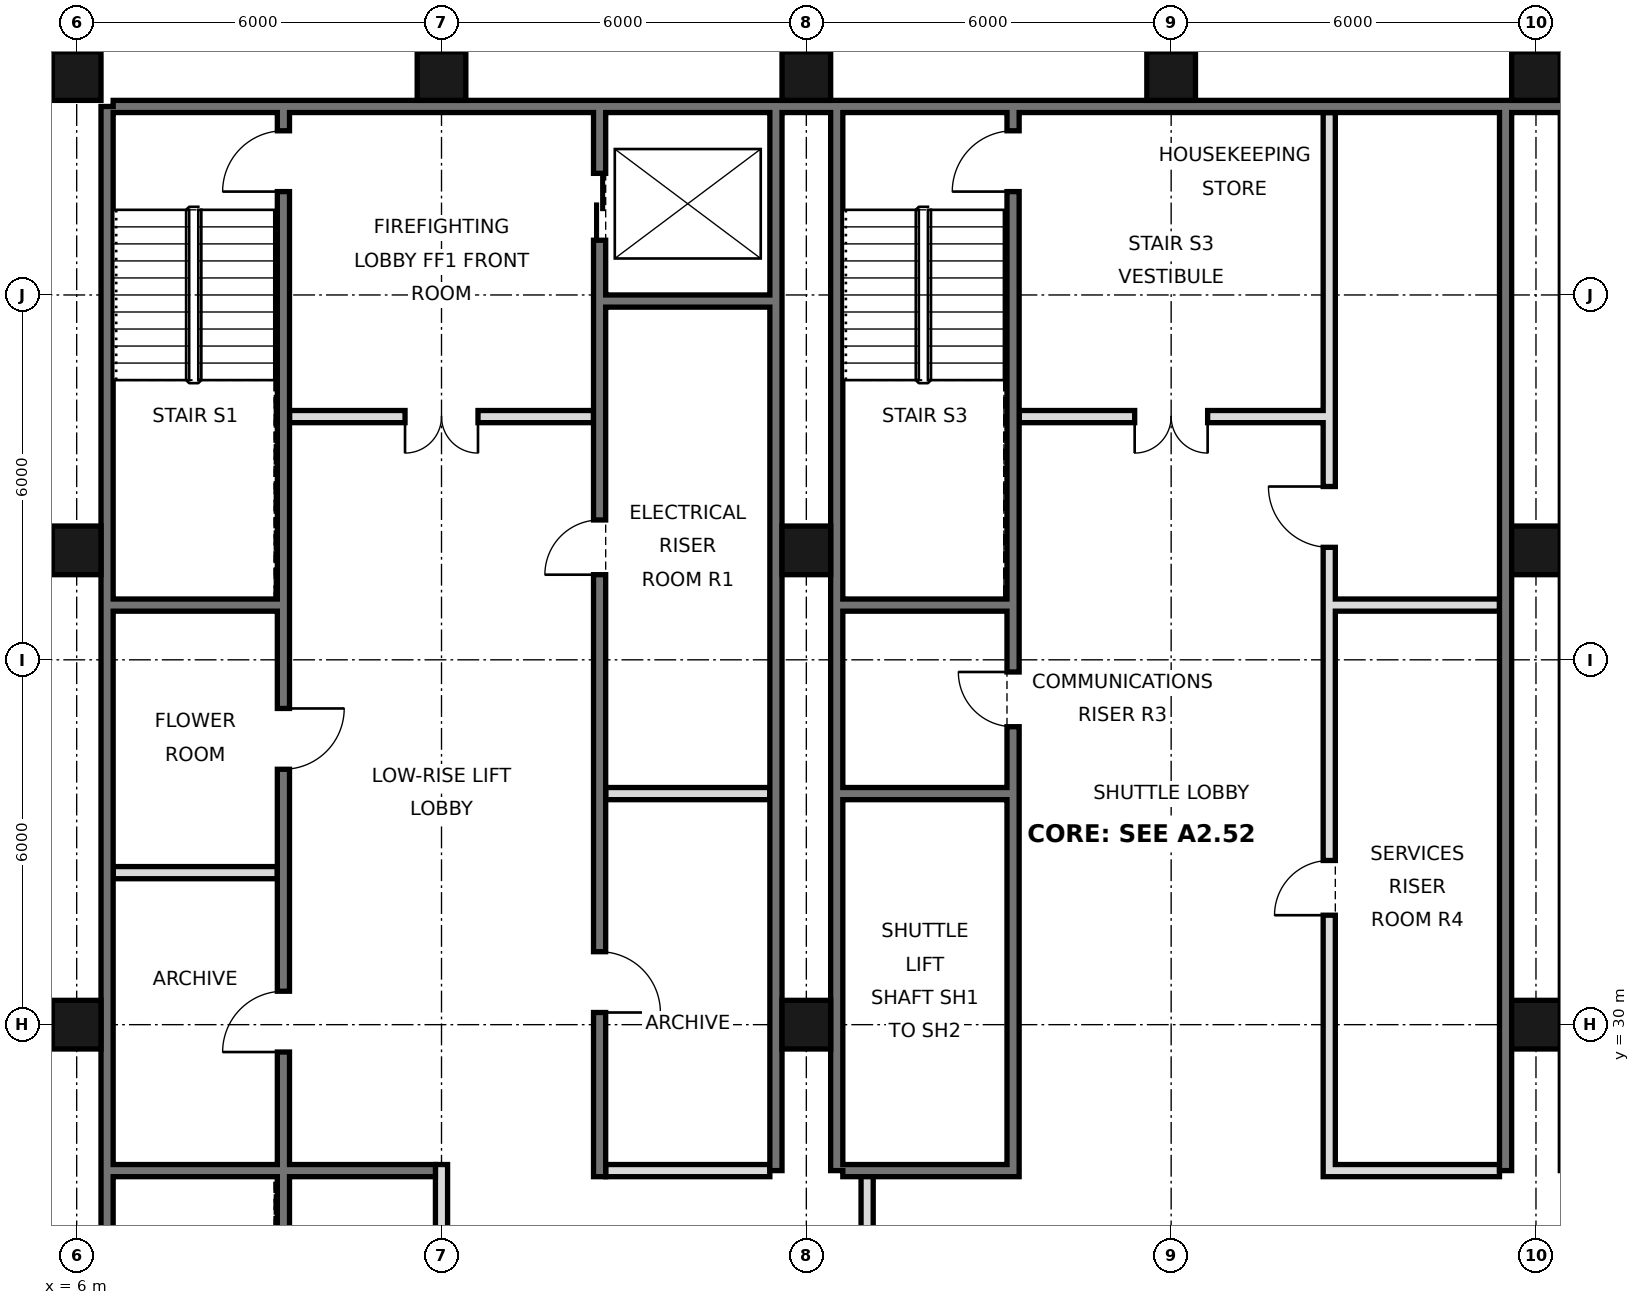
"""IFC4 building model, lengths in metres.
Left out: names, types, materials, properties, quantities, classifications, styles, units other than length and angle.
Written with IfcOpenShell. Run it as: python <this file> out.ifc"""

import sys

from ifc_helpers import new_model, si_unit, direction, frame, frame_2d, origin, origin_2d, place, context, subcontext, project, spatial, rectangle, hollow_rectangle, extrude, element, fill, save


model = new_model("IFC4")
c1 = context("Model", 3, precision=1e-05, world=origin(), true_north=direction((0.0, 1.0)))
c2 = subcontext(c1, "Body", "Model", "MODEL_VIEW")
j1 = project(units=[si_unit("LENGTHUNIT", "METRE"), si_unit("PLANEANGLEUNIT", "RADIAN")], contexts=[c1])
p1 = place(None, origin())
s1 = spatial("IfcSite", under=j1, at=p1, CompositionType="ELEMENT")
p2 = place(p1, origin())
s2 = spatial("IfcBuilding", under=s1, at=p2, CompositionType="ELEMENT")
p3 = place(p2, frame((0.0, 0.0, 206.4)))
s3 = spatial("IfcBuildingStorey", under=s2, at=p3, CompositionType="ELEMENT", Elevation=206.4)
for number, where, z_axis, x_axis in (
    (1, (6.0, 30.0, 0.0), (0.0, 0.0, 1.0), (1.0, 0.0, 0.0)),
    (2, (6.0, 37.8, 0.0), (0.0, 0.0, 1.0), (1.0, 0.0, 0.0)),
    (3, (6.0, 45.6, 0.0), (0.0, 0.0, 1.0), (1.0, 0.0, 0.0)),
    (4, (12.0, 45.6, 0.0), (0.0, 0.0, 1.0), (1.0, 0.0, 0.0)),
    (5, (18.0, 30.0, 0.0), (0.0, 0.0, 1.0), (1.0, 0.0, 0.0)),
    (6, (18.0, 37.8, 0.0), (0.0, 0.0, 1.0), (1.0, 0.0, 0.0)),
    (7, (18.0, 45.6, 0.0), (0.0, 0.0, 1.0), (1.0, 0.0, 0.0)),
    (8, (24.0, 45.6, 0.0), (0.0, 0.0, 1.0), (1.0, 0.0, 0.0)),
    (9, (30.0, 30.0, 0.0), (0.0, 0.0, 1.0), (1.0, 0.0, 0.0)),
    (10, (30.0, 37.8, 0.0), (0.0, 0.0, 1.0), (1.0, 0.0, 0.0)),
    (11, (30.0, 45.6, 0.0), (0.0, 0.0, 1.0), (1.0, 0.0, 0.0)),
):
    element("IfcColumn", number, at=place(p3, frame(where, z_axis=z_axis, x_axis=x_axis)), inside=s3, PredefinedType="COLUMN", context=c2, shape_type="SweptSolid", body=[
        extrude(hollow_rectangle(XDim=0.8, YDim=0.8, WallThickness=0.04, at=origin_2d()), origin(), (0.0, 0.0, 1.0), 3.6),
    ])
p4 = place(p3, frame((6.5, 21.6, 0.0), z_axis=(0.0, 0.0, 1.0), x_axis=(0.0, 1.0, 0.0)))
e12 = element("IfcWall", 12, at=p4, inside=s3, PredefinedType="SOLIDWALL", context=c2, shape_type="SweptSolid", body=[
    extrude(rectangle(XDim=23.5, YDim=0.2, at=frame_2d((11.75, 0.0))), origin(), (0.0, 0.0, 1.0), 3.38),
])
p5 = place(p3, frame((6.6, 45.1, 0.0), z_axis=(0.0, 0.0, 1.0), x_axis=(1.0, 0.0, 0.0)))
e13 = element("IfcWall", 13, at=p5, inside=s3, PredefinedType="SOLIDWALL", context=c2, shape_type="SweptSolid", body=[
    extrude(rectangle(XDim=34.8, YDim=0.2, at=frame_2d((17.4, 0.0))), origin(), (0.0, 0.0, 1.0), 3.38),
])
for number, where, z_axis, x_axis in (
    (14, (17.5, 27.6, 0.0), (0.0, 0.0, 1.0), (0.0, 1.0, 0.0)),
    (15, (18.5, 27.6, 0.0), (0.0, 0.0, 1.0), (0.0, 1.0, 0.0)),
    (16, (29.5, 27.6, 0.0), (0.0, 0.0, 1.0), (0.0, 1.0, 0.0)),
):
    element("IfcWall", number, at=place(p3, frame(where, z_axis=z_axis, x_axis=x_axis)), inside=s3, PredefinedType="SOLIDWALL", context=c2, shape_type="SweptSolid", body=[
        extrude(rectangle(XDim=17.5, YDim=0.2, at=frame_2d((8.75, 0.0))), origin(), (0.0, 0.0, 1.0), 3.38),
    ])
p6 = place(p3, frame((19.0, 21.6, 0.0), z_axis=(0.0, 0.0, 1.0), x_axis=(0.0, 1.0, 0.0)))
e17 = element("IfcWall", 17, at=p6, inside=s3, PredefinedType="PARTITIONING", context=c2, shape_type="SweptSolid", body=[
    extrude(rectangle(XDim=6.0, YDim=0.2, at=frame_2d((3.0, 0.0))), origin(), (0.0, 0.0, 1.0), 3.38),
])
p7 = place(p6, frame((2.1, 0.0, 0.0)))
e18 = element("IfcOpeningElement", 18, at=p7, cuts=e17, PredefinedType="OPENING", context=c2, shape_type="SweptSolid", body=[
    extrude(rectangle(XDim=1.8, YDim=2.1, at=frame_2d((0.9, 1.05))), frame((0.0, 0.11, 0.0), z_axis=(0.0, -1.0, 0.0), x_axis=(1.0, 0.0, 0.0)), (0.0, 0.0, 1.0), 0.22),
])
p8 = place(p3, frame((12.0, 21.6, 0.0), z_axis=(0.0, 0.0, 1.0), x_axis=(0.0, 1.0, 0.0)))
e19 = element("IfcWall", 19, at=p8, inside=s3, PredefinedType="PARTITIONING", context=c2, shape_type="SweptSolid", body=[
    extrude(rectangle(XDim=6.1, YDim=0.2, at=frame_2d((3.05, 0.0))), origin(), (0.0, 0.0, 1.0), 3.38),
])
p9 = place(p3, frame((14.6, 27.5, 0.0), z_axis=(0.0, 0.0, 1.0), x_axis=(0.0, 1.0, 0.0)))
e20 = element("IfcWall", 20, at=p9, inside=s3, PredefinedType="SOLIDWALL", context=c2, shape_type="SweptSolid", body=[
    extrude(rectangle(XDim=17.5, YDim=0.2, at=frame_2d((8.75, 0.0))), origin(), (0.0, 0.0, 1.0), 3.38),
])
p10 = place(p9, frame((15.4, 0.0, 0.0)))
e21 = element("IfcOpeningElement", 21, at=p10, cuts=e20, PredefinedType="OPENING", context=c2, shape_type="SweptSolid", body=[
    extrude(rectangle(XDim=1.1, YDim=2.1, at=frame_2d((0.55, 1.05))), frame((0.0, 0.11, 0.0), z_axis=(0.0, -1.0, 0.0), x_axis=(1.0, 0.0, 0.0)), (0.0, 0.0, 1.0), 0.22),
])
p11 = place(p9, frame((2.7, 0.0, 0.0)))
e22 = element("IfcOpeningElement", 22, at=p11, cuts=e20, PredefinedType="OPENING", context=c2, shape_type="SweptSolid", body=[
    extrude(rectangle(XDim=1.0, YDim=2.1, at=frame_2d((0.5, 1.05))), frame((0.0, 0.11, 0.0), z_axis=(0.0, -1.0, 0.0), x_axis=(1.0, 0.0, 0.0)), (0.0, 0.0, 1.0), 0.22),
])
p12 = place(p9, frame((9.9, 0.0, 0.0)))
e23 = element("IfcOpeningElement", 23, at=p12, cuts=e20, PredefinedType="OPENING", context=c2, shape_type="SweptSolid", body=[
    extrude(rectangle(XDim=0.9, YDim=2.1, at=frame_2d((0.45, 1.05))), frame((0.0, 0.11, 0.0), z_axis=(0.0, -1.0, 0.0), x_axis=(1.0, 0.0, 0.0)), (0.0, 0.0, 1.0), 0.22),
])
p13 = place(p3, frame((21.4, 27.5, 0.0), z_axis=(0.0, 0.0, 1.0), x_axis=(0.0, 1.0, 0.0)))
e24 = element("IfcWall", 24, at=p13, inside=s3, PredefinedType="SOLIDWALL", context=c2, shape_type="SweptSolid", body=[
    extrude(rectangle(XDim=17.5, YDim=0.2, at=frame_2d((8.75, 0.0))), origin(), (0.0, 0.0, 1.0), 3.38),
])
p14 = place(p13, frame((16.2, 0.0, 0.0)))
e25 = element("IfcOpeningElement", 25, at=p14, cuts=e24, PredefinedType="OPENING", context=c2, shape_type="SweptSolid", body=[
    extrude(rectangle(XDim=1.0, YDim=2.1, at=frame_2d((0.5, 1.05))), frame((0.0, 0.11, 0.0), z_axis=(0.0, -1.0, 0.0), x_axis=(1.0, 0.0, 0.0)), (0.0, 0.0, 1.0), 0.22),
])
p15 = place(p13, frame((7.4, 0.0, 0.0)))
e26 = element("IfcOpeningElement", 26, at=p15, cuts=e24, PredefinedType="OPENING", context=c2, shape_type="SweptSolid", body=[
    extrude(rectangle(XDim=0.9, YDim=2.1, at=frame_2d((0.45, 1.05))), frame((0.0, 0.11, 0.0), z_axis=(0.0, -1.0, 0.0), x_axis=(1.0, 0.0, 0.0)), (0.0, 0.0, 1.0), 0.22),
])
p16 = place(p3, frame((26.6, 27.5, 0.0), z_axis=(0.0, 0.0, 1.0), x_axis=(0.0, 1.0, 0.0)))
e27 = element("IfcWall", 27, at=p16, inside=s3, PredefinedType="SOLIDWALL", context=c2, shape_type="SweptSolid", body=[
    extrude(rectangle(XDim=17.5, YDim=0.2, at=frame_2d((8.75, 0.0))), origin(), (0.0, 0.0, 1.0), 3.38),
])
p17 = place(p16, frame((4.3, 0.0, 0.0)))
e28 = element("IfcOpeningElement", 28, at=p17, cuts=e27, PredefinedType="OPENING", context=c2, shape_type="SweptSolid", body=[
    extrude(rectangle(XDim=0.9, YDim=2.1, at=frame_2d((0.45, 1.05))), frame((0.0, 0.11, 0.0), z_axis=(0.0, -1.0, 0.0), x_axis=(1.0, 0.0, 0.0)), (0.0, 0.0, 1.0), 0.22),
])
p18 = place(p16, frame((10.35, 0.0, 0.0)))
e29 = element("IfcOpeningElement", 29, at=p18, cuts=e27, PredefinedType="OPENING", context=c2, shape_type="SweptSolid", body=[
    extrude(rectangle(XDim=1.0, YDim=2.1, at=frame_2d((0.5, 1.05))), frame((0.0, 0.11, 0.0), z_axis=(0.0, -1.0, 0.0), x_axis=(1.0, 0.0, 0.0)), (0.0, 0.0, 1.0), 0.22),
])
p19 = place(p3, frame((9.4, 21.6, 0.0), z_axis=(0.0, 0.0, 1.0), x_axis=(0.0, 1.0, 0.0)))
e30 = element("IfcWall", 30, at=p19, inside=s3, PredefinedType="SOLIDWALL", context=c2, shape_type="SweptSolid", body=[
    extrude(rectangle(XDim=23.4, YDim=0.2, at=frame_2d((11.7, 0.0))), origin(), (0.0, 0.0, 1.0), 3.38),
])
p20 = place(p19, frame((7.95, 0.0, 0.0)))
e31 = element("IfcOpeningElement", 31, at=p20, cuts=e30, PredefinedType="OPENING", context=c2, shape_type="SweptSolid", body=[
    extrude(rectangle(XDim=1.0, YDim=2.1, at=frame_2d((0.5, 1.05))), frame((0.0, 0.11, 0.0), z_axis=(0.0, -1.0, 0.0), x_axis=(1.0, 0.0, 0.0)), (0.0, 0.0, 1.0), 0.22),
])
p21 = place(p19, frame((12.6, 0.0, 0.0)))
e32 = element("IfcOpeningElement", 32, at=p21, cuts=e30, PredefinedType="OPENING", context=c2, shape_type="SweptSolid", body=[
    extrude(rectangle(XDim=1.0, YDim=2.1, at=frame_2d((0.5, 1.05))), frame((0.0, 0.11, 0.0), z_axis=(0.0, -1.0, 0.0), x_axis=(1.0, 0.0, 0.0)), (0.0, 0.0, 1.0), 0.22),
])
p22 = place(p19, frame((22.1, 0.0, 0.0)))
e33 = element("IfcOpeningElement", 33, at=p22, cuts=e30, PredefinedType="OPENING", context=c2, shape_type="SweptSolid", body=[
    extrude(rectangle(XDim=1.0, YDim=2.1, at=frame_2d((0.5, 1.05))), frame((0.0, 0.11, 0.0), z_axis=(0.0, -1.0, 0.0), x_axis=(1.0, 0.0, 0.0)), (0.0, 0.0, 1.0), 0.22),
])
p23 = place(p19, frame((0.175, 0.0, 0.0)))
e34 = element("IfcOpeningElement", 34, at=p23, cuts=e30, PredefinedType="OPENING", context=c2, shape_type="SweptSolid", body=[
    extrude(rectangle(XDim=0.9, YDim=2.1, at=frame_2d((0.45, 1.05))), frame((0.0, 0.11, 0.0), z_axis=(0.0, -1.0, 0.0), x_axis=(1.0, 0.0, 0.0)), (0.0, 0.0, 1.0), 0.22),
])
p24 = place(p3, frame((14.7, 27.6, 0.0), z_axis=(0.0, 0.0, 1.0), x_axis=(1.0, 0.0, 0.0)))
e35 = element("IfcWall", 35, at=p24, inside=s3, PredefinedType="PARTITIONING", context=c2, shape_type="SweptSolid", body=[
    extrude(rectangle(XDim=2.7, YDim=0.2, at=frame_2d((1.35, 0.0))), origin(), (0.0, 0.0, 1.0), 3.38),
])
for number, where, z_axis, x_axis in (
    (36, (18.6, 27.6, 0.0), (0.0, 0.0, 1.0), (1.0, 0.0, 0.0)),
    (37, (26.7, 27.6, 0.0), (0.0, 0.0, 1.0), (1.0, 0.0, 0.0)),
):
    element("IfcWall", number, at=place(p3, frame(where, z_axis=z_axis, x_axis=x_axis)), inside=s3, PredefinedType="SOLIDWALL", context=c2, shape_type="SweptSolid", body=[
        extrude(rectangle(XDim=2.7, YDim=0.2, at=frame_2d((1.35, 0.0))), origin(), (0.0, 0.0, 1.0), 3.38),
    ])
p25 = place(p3, frame((6.6, 27.6, 0.0), z_axis=(0.0, 0.0, 1.0), x_axis=(1.0, 0.0, 0.0)))
e38 = element("IfcWall", 38, at=p25, inside=s3, PredefinedType="SOLIDWALL", context=c2, shape_type="SweptSolid", body=[
    extrude(rectangle(XDim=5.3, YDim=0.2, at=frame_2d((2.65, 0.0))), origin(), (0.0, 0.0, 1.0), 3.38),
])
p26 = place(p3, frame((6.6, 32.5, 0.0), z_axis=(0.0, 0.0, 1.0), x_axis=(1.0, 0.0, 0.0)))
e39 = element("IfcWall", 39, at=p26, inside=s3, PredefinedType="PARTITIONING", context=c2, shape_type="SweptSolid", body=[
    extrude(rectangle(XDim=2.7, YDim=0.2, at=frame_2d((1.35, 0.0))), origin(), (0.0, 0.0, 1.0), 3.38),
])
for number, where, z_axis, x_axis in (
    (40, (14.7, 33.8, 0.0), (0.0, 0.0, 1.0), (1.0, 0.0, 0.0)),
    (41, (18.6, 33.8, 0.0), (0.0, 0.0, 1.0), (1.0, 0.0, 0.0)),
    (42, (18.6, 36.9, 0.0), (0.0, 0.0, 1.0), (1.0, 0.0, 0.0)),
    (43, (26.7, 36.9, 0.0), (0.0, 0.0, 1.0), (1.0, 0.0, 0.0)),
    (44, (6.6, 36.9, 0.0), (0.0, 0.0, 1.0), (1.0, 0.0, 0.0)),
):
    element("IfcWall", number, at=place(p3, frame(where, z_axis=z_axis, x_axis=x_axis)), inside=s3, PredefinedType="SOLIDWALL", context=c2, shape_type="SweptSolid", body=[
        extrude(rectangle(XDim=2.7, YDim=0.2, at=frame_2d((1.35, 0.0))), origin(), (0.0, 0.0, 1.0), 3.38),
    ])
p27 = place(p3, frame((21.5, 40.0, 0.0), z_axis=(0.0, 0.0, 1.0), x_axis=(1.0, 0.0, 0.0)))
e45 = element("IfcWall", 45, at=p27, inside=s3, PredefinedType="PARTITIONING", context=c2, shape_type="SweptSolid", body=[
    extrude(rectangle(XDim=5.0, YDim=0.2, at=frame_2d((2.5, 0.0))), origin(), (0.0, 0.0, 1.0), 3.38),
])
p28 = place(p27, frame((1.9, 0.0, 0.0)))
e46 = element("IfcOpeningElement", 46, at=p28, cuts=e45, PredefinedType="OPENING", context=c2, shape_type="SweptSolid", body=[
    extrude(rectangle(XDim=1.2, YDim=2.1, at=frame_2d((0.6, 1.05))), frame((0.0, 0.11, 0.0), z_axis=(0.0, -1.0, 0.0), x_axis=(1.0, 0.0, 0.0)), (0.0, 0.0, 1.0), 0.22),
])
p29 = place(p3, frame((9.5, 40.0, 0.0), z_axis=(0.0, 0.0, 1.0), x_axis=(1.0, 0.0, 0.0)))
e47 = element("IfcWall", 47, at=p29, inside=s3, PredefinedType="PARTITIONING", context=c2, shape_type="SweptSolid", body=[
    extrude(rectangle(XDim=5.0, YDim=0.2, at=frame_2d((2.5, 0.0))), origin(), (0.0, 0.0, 1.0), 3.38),
])
p30 = place(p29, frame((1.9, 0.0, 0.0)))
e48 = element("IfcOpeningElement", 48, at=p30, cuts=e47, PredefinedType="OPENING", context=c2, shape_type="SweptSolid", body=[
    extrude(rectangle(XDim=1.2, YDim=2.1, at=frame_2d((0.6, 1.05))), frame((0.0, 0.11, 0.0), z_axis=(0.0, -1.0, 0.0), x_axis=(1.0, 0.0, 0.0)), (0.0, 0.0, 1.0), 0.22),
])
p31 = place(p3, frame((14.7, 41.9, 0.0), z_axis=(0.0, 0.0, 1.0), x_axis=(1.0, 0.0, 0.0)))
e49 = element("IfcWall", 49, at=p31, inside=s3, PredefinedType="SOLIDWALL", context=c2, shape_type="SweptSolid", body=[
    extrude(rectangle(XDim=2.7, YDim=0.2, at=frame_2d((1.35, 0.0))), origin(), (0.0, 0.0, 1.0), 3.38),
])
p32 = place(p30, frame((1.2, 0.0, 0.0), z_axis=(0.0, 0.0, 1.0), x_axis=(-1.0, 0.0, 0.0)))
e50 = element("IfcDoor", 50, at=p32, inside=s3, OperationType="DOUBLE_DOOR_SINGLE_SWING", PredefinedType="DOOR", context=c2, shape_type="SweptSolid", body=[
    extrude(rectangle(XDim=1.2, YDim=2.1, at=frame_2d((0.6, 1.05))), frame((0.0, 0.025, 0.0), z_axis=(0.0, -1.0, 0.0), x_axis=(1.0, 0.0, 0.0)), (0.0, 0.0, 1.0), 0.05),
])
fill(e48, e50)
p33 = place(p28, frame((1.2, 0.0, 0.0), z_axis=(0.0, 0.0, 1.0), x_axis=(-1.0, 0.0, 0.0)))
e51 = element("IfcDoor", 51, at=p33, inside=s3, OperationType="DOUBLE_DOOR_SINGLE_SWING", PredefinedType="DOOR", context=c2, shape_type="SweptSolid", body=[
    extrude(rectangle(XDim=1.2, YDim=2.1, at=frame_2d((0.6, 1.05))), frame((0.0, 0.025, 0.0), z_axis=(0.0, -1.0, 0.0), x_axis=(1.0, 0.0, 0.0)), (0.0, 0.0, 1.0), 0.05),
])
fill(e46, e51)
p34 = place(p10, origin())
e52 = element("IfcDoor", 52, at=p34, inside=s3, OperationType="DOUBLE_DOOR_SLIDING", PredefinedType="DOOR", context=c2, shape_type="SweptSolid", body=[
    extrude(rectangle(XDim=1.1, YDim=2.1, at=frame_2d((0.55, 1.05))), frame((0.0, 0.025, 0.0), z_axis=(0.0, -1.0, 0.0), x_axis=(1.0, 0.0, 0.0)), (0.0, 0.0, 1.0), 0.05),
])
fill(e21, e52)
p35 = place(p11, frame((1.0, 0.0, 0.0), z_axis=(0.0, 0.0, 1.0), x_axis=(-1.0, 0.0, 0.0)))
e53 = element("IfcDoor", 53, at=p35, inside=s3, OperationType="SINGLE_SWING_RIGHT", PredefinedType="DOOR", context=c2, shape_type="SweptSolid", body=[
    extrude(rectangle(XDim=1.0, YDim=2.1, at=frame_2d((0.5, 1.05))), frame((0.0, 0.025, 0.0), z_axis=(0.0, -1.0, 0.0), x_axis=(1.0, 0.0, 0.0)), (0.0, 0.0, 1.0), 0.05),
])
fill(e22, e53)
p36 = place(p20, origin())
e54 = element("IfcDoor", 54, at=p36, inside=s3, OperationType="SINGLE_SWING_LEFT", PredefinedType="DOOR", context=c2, shape_type="SweptSolid", body=[
    extrude(rectangle(XDim=1.0, YDim=2.1, at=frame_2d((0.5, 1.05))), frame((0.0, 0.025, 0.0), z_axis=(0.0, -1.0, 0.0), x_axis=(1.0, 0.0, 0.0)), (0.0, 0.0, 1.0), 0.05),
])
fill(e31, e54)
p37 = place(p21, origin())
e55 = element("IfcDoor", 55, at=p37, inside=s3, OperationType="SINGLE_SWING_RIGHT", PredefinedType="DOOR", context=c2, shape_type="SweptSolid", body=[
    extrude(rectangle(XDim=1.0, YDim=2.1, at=frame_2d((0.5, 1.05))), frame((0.0, 0.025, 0.0), z_axis=(0.0, -1.0, 0.0), x_axis=(1.0, 0.0, 0.0)), (0.0, 0.0, 1.0), 0.05),
])
fill(e32, e55)
p38 = place(p22, origin())
e56 = element("IfcDoor", 56, at=p38, inside=s3, OperationType="SINGLE_SWING_LEFT", PredefinedType="DOOR", context=c2, shape_type="SweptSolid", body=[
    extrude(rectangle(XDim=1.0, YDim=2.1, at=frame_2d((0.5, 1.05))), frame((0.0, 0.025, 0.0), z_axis=(0.0, -1.0, 0.0), x_axis=(1.0, 0.0, 0.0)), (0.0, 0.0, 1.0), 0.05),
])
fill(e33, e56)
p39 = place(p14, origin())
e57 = element("IfcDoor", 57, at=p39, inside=s3, OperationType="SINGLE_SWING_LEFT", PredefinedType="DOOR", context=c2, shape_type="SweptSolid", body=[
    extrude(rectangle(XDim=1.0, YDim=2.1, at=frame_2d((0.5, 1.05))), frame((0.0, 0.025, 0.0), z_axis=(0.0, -1.0, 0.0), x_axis=(1.0, 0.0, 0.0)), (0.0, 0.0, 1.0), 0.05),
])
fill(e25, e57)
p40 = place(p12, origin())
e58 = element("IfcDoor", 58, at=p40, inside=s3, OperationType="SINGLE_SWING_LEFT", PredefinedType="DOOR", context=c2, shape_type="SweptSolid", body=[
    extrude(rectangle(XDim=0.9, YDim=2.1, at=frame_2d((0.45, 1.05))), frame((0.0, 0.025, 0.0), z_axis=(0.0, -1.0, 0.0), x_axis=(1.0, 0.0, 0.0)), (0.0, 0.0, 1.0), 0.05),
])
fill(e23, e58)
p41 = place(p15, frame((0.9, 0.0, 0.0), z_axis=(0.0, 0.0, 1.0), x_axis=(-1.0, 0.0, 0.0)))
e59 = element("IfcDoor", 59, at=p41, inside=s3, OperationType="SINGLE_SWING_LEFT", PredefinedType="DOOR", context=c2, shape_type="SweptSolid", body=[
    extrude(rectangle(XDim=0.9, YDim=2.1, at=frame_2d((0.45, 1.05))), frame((0.0, 0.025, 0.0), z_axis=(0.0, -1.0, 0.0), x_axis=(1.0, 0.0, 0.0)), (0.0, 0.0, 1.0), 0.05),
])
fill(e26, e59)
p42 = place(p17, origin())
e60 = element("IfcDoor", 60, at=p42, inside=s3, OperationType="SINGLE_SWING_LEFT", PredefinedType="DOOR", context=c2, shape_type="SweptSolid", body=[
    extrude(rectangle(XDim=0.9, YDim=2.1, at=frame_2d((0.45, 1.05))), frame((0.0, 0.025, 0.0), z_axis=(0.0, -1.0, 0.0), x_axis=(1.0, 0.0, 0.0)), (0.0, 0.0, 1.0), 0.05),
])
fill(e28, e60)
p43 = place(p18, frame((1.0, 0.0, 0.0), z_axis=(0.0, 0.0, 1.0), x_axis=(-1.0, 0.0, 0.0)))
e61 = element("IfcDoor", 61, at=p43, inside=s3, OperationType="SINGLE_SWING_LEFT", PredefinedType="DOOR", context=c2, shape_type="SweptSolid", body=[
    extrude(rectangle(XDim=1.0, YDim=2.1, at=frame_2d((0.5, 1.05))), frame((0.0, 0.025, 0.0), z_axis=(0.0, -1.0, 0.0), x_axis=(1.0, 0.0, 0.0)), (0.0, 0.0, 1.0), 0.05),
])
fill(e29, e61)
save(model, sys.argv[1])
